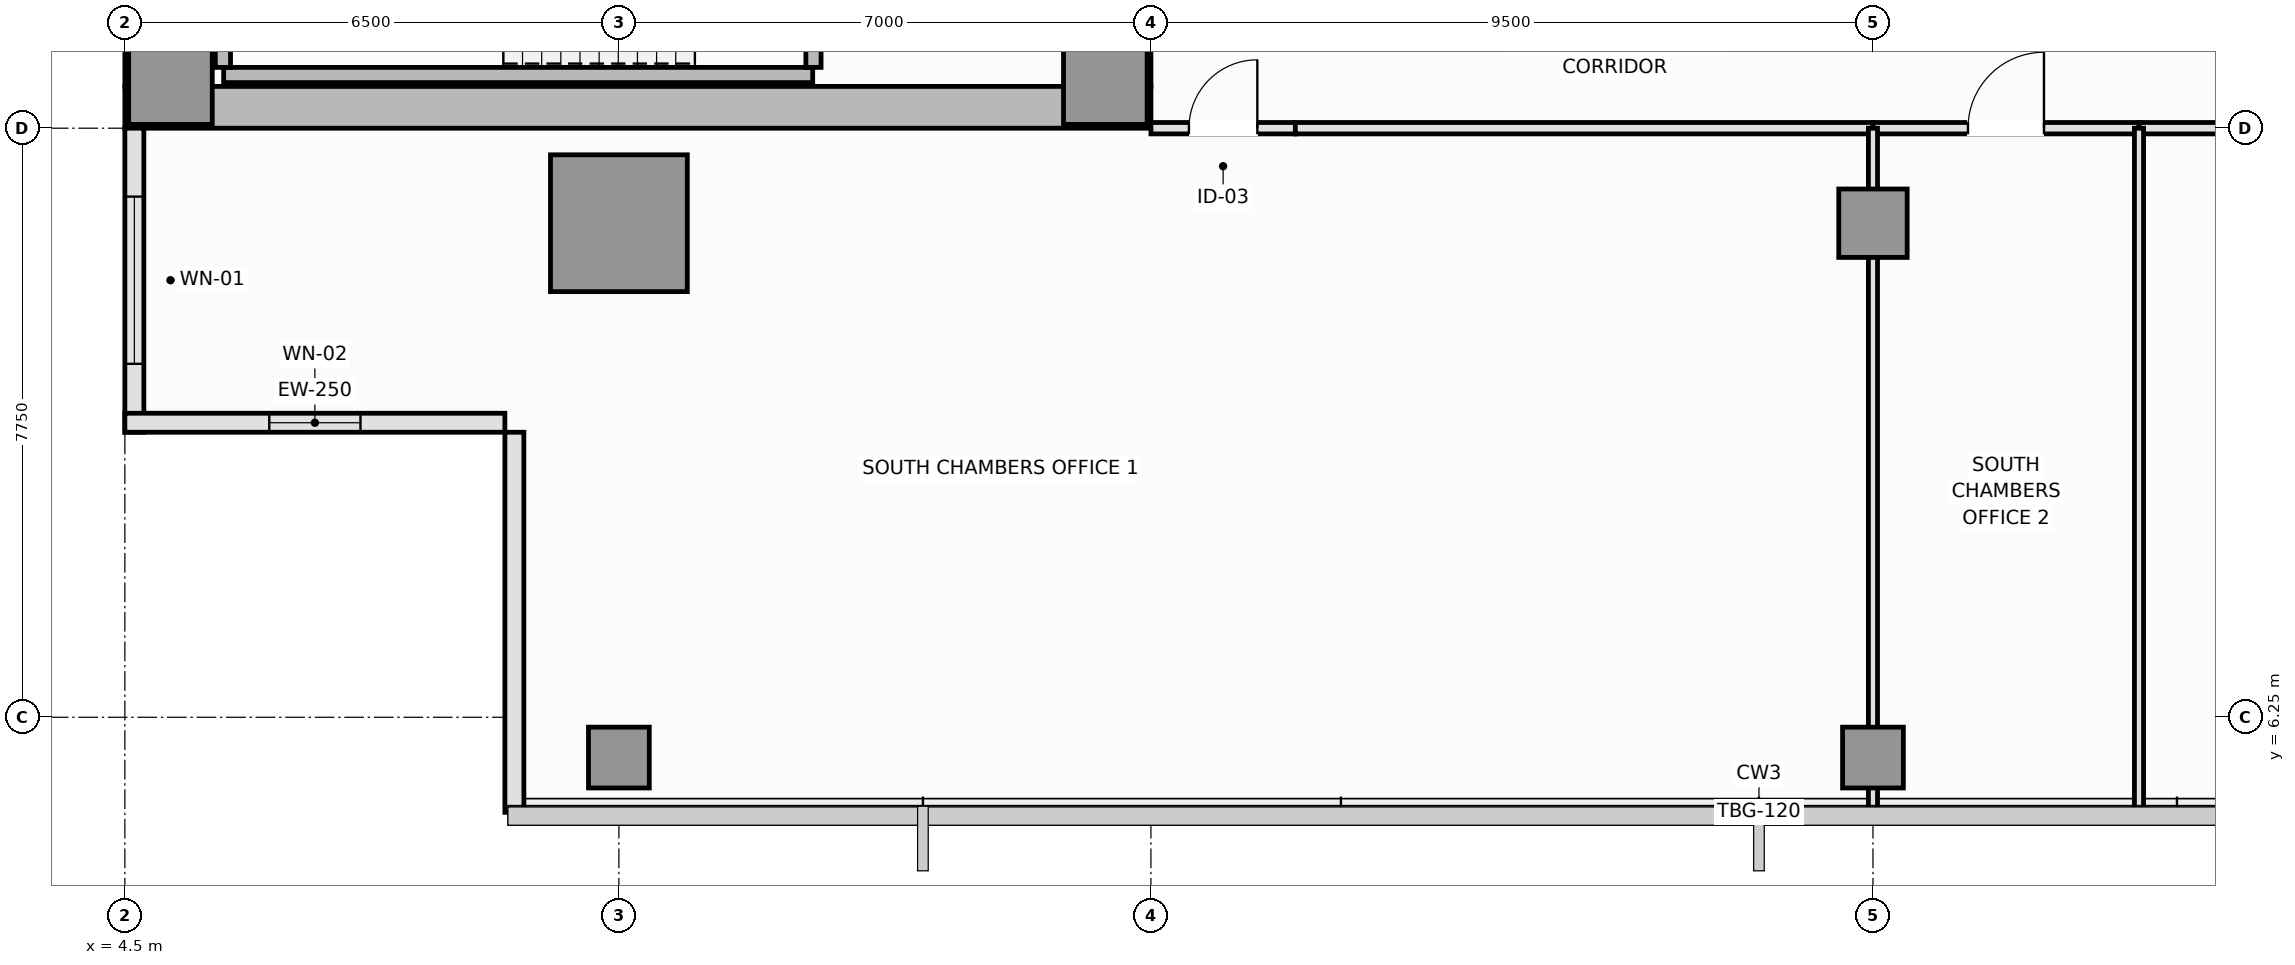
"""IFC4 building model, lengths in metres.
Left out: names, types, materials, properties, quantities, classifications, styles, units other than length and angle.
Written with IfcOpenShell. Run it as: python <this file> out.ifc"""

import sys

from ifc_helpers import new_model, si_unit, direction, frame, frame_2d, origin, origin_2d, place, context, subcontext, project, spatial, rectangle, extrude, element, fill, save


model = new_model("IFC4")
c1 = context("Model", 3, precision=1e-05, world=origin(), true_north=direction((0.0, 1.0)))
c2 = subcontext(c1, "Body", "Model", "MODEL_VIEW")
j1 = project(units=[si_unit("LENGTHUNIT", "METRE"), si_unit("PLANEANGLEUNIT", "RADIAN")], contexts=[c1])
p1 = place(None, origin())
s1 = spatial("IfcSite", under=j1, at=p1, CompositionType="ELEMENT")
p2 = place(p1, origin())
s2 = spatial("IfcBuilding", under=s1, at=p2, CompositionType="ELEMENT")
p3 = place(p2, frame((0.0, 0.0, 223.55)))
s3 = spatial("IfcBuildingStorey", under=s2, at=p3, CompositionType="ELEMENT", Elevation=223.55)
p4 = place(p3, frame((4.5, 14.275, 0.0), z_axis=(0.0, 0.0, 1.0), x_axis=(1.0, 0.0, 0.0)))
e1 = element("IfcWall", 1, at=p4, inside=s3, PredefinedType="SHEAR", context=c2, shape_type="SweptSolid", body=[
    extrude(rectangle(XDim=13.5, YDim=0.55, at=frame_2d((6.75, 0.0))), origin(), (0.0, 0.0, 1.0), 3.55),
])
p5 = place(p3, frame((4.775, 14.55, 0.0), z_axis=(0.0, 0.0, 1.0), x_axis=(0.0, 1.0, 0.0)))
e2 = element("IfcWall", 2, at=p5, inside=s3, PredefinedType="SHEAR", context=c2, shape_type="SweptSolid", body=[
    extrude(rectangle(XDim=21.4, YDim=0.55, at=frame_2d((10.7, 0.0))), origin(), (0.0, 0.0, 1.0), 3.55),
])
p6 = place(p3, frame((17.725, 14.55, 0.0), z_axis=(0.0, 0.0, 1.0), x_axis=(0.0, 1.0, 0.0)))
e3 = element("IfcWall", 3, at=p6, inside=s3, PredefinedType="SHEAR", context=c2, shape_type="SweptSolid", body=[
    extrude(rectangle(XDim=8.9, YDim=0.55, at=frame_2d((4.45, 0.0))), origin(), (0.0, 0.0, 1.0), 3.55),
])
p7 = place(p6, frame((4.35, 0.0, 0.0)))
e4 = element("IfcOpeningElement", 4, at=p7, cuts=e3, PredefinedType="OPENING", context=c2, shape_type="SweptSolid", body=[
    extrude(rectangle(XDim=1.1, YDim=2.15, at=frame_2d((0.55, 1.075))), frame((0.0, 0.285, 0.0), z_axis=(0.0, -1.0, 0.0), x_axis=(1.0, 0.0, 0.0)), (0.0, 0.0, 1.0), 0.57),
])
for number, where, z_axis, x_axis in (
    (5, (5.1, 14.6, 0.0), (0.0, 0.0, 1.0), (1.0, 0.0, 0.0)),
    (6, (17.4, 14.6, 0.0), (0.0, 0.0, 1.0), (1.0, 0.0, 0.0)),
):
    element("IfcColumn", number, at=place(p3, frame(where, z_axis=z_axis, x_axis=x_axis)), inside=s3, PredefinedType="PILASTER", context=c2, shape_type="SweptSolid", body=[
        extrude(rectangle(XDim=1.1, YDim=1.1, at=origin_2d()), origin(), (0.0, 0.0, 1.0), 3.55),
    ])
p8 = place(p3, frame((11.0, 12.75, 0.0), z_axis=(0.0, 0.0, 1.0), x_axis=(1.0, 0.0, 0.0)))
e7 = element("IfcColumn", 7, at=p8, inside=s3, PredefinedType="COLUMN", context=c2, shape_type="SweptSolid", body=[
    extrude(rectangle(XDim=1.8, YDim=1.8, at=origin_2d()), origin(), (0.0, 0.0, 1.0), 3.55),
])
p9 = place(p3, frame((27.5, 12.75, 0.0), z_axis=(0.0, 0.0, 1.0), x_axis=(1.0, 0.0, 0.0)))
e8 = element("IfcColumn", 8, at=p9, inside=s3, PredefinedType="COLUMN", context=c2, shape_type="SweptSolid", body=[
    extrude(rectangle(XDim=0.9, YDim=0.9, at=origin_2d()), origin(), (0.0, 0.0, 1.0), 3.55),
])
for number, where, z_axis, x_axis in (
    (9, (11.0, 5.72, 0.0), (0.0, 0.0, 1.0), (1.0, 0.0, 0.0)),
    (10, (27.5, 5.72, 0.0), (0.0, 0.0, 1.0), (1.0, 0.0, 0.0)),
):
    element("IfcColumn", number, at=place(p3, frame(where, z_axis=z_axis, x_axis=x_axis)), inside=s3, PredefinedType="COLUMN", context=c2, shape_type="SweptSolid", body=[
        extrude(rectangle(XDim=0.8, YDim=0.8, at=origin_2d()), origin(), (0.0, 0.0, 1.0), 3.55),
    ])
p10 = place(p3, frame((4.625, 14.0, 0.0), z_axis=(0.0, 0.0, 1.0), x_axis=(0.0, -1.0, 0.0)))
e11 = element("IfcWall", 11, at=p10, inside=s3, PredefinedType="SOLIDWALL", context=c2, shape_type="SweptSolid", body=[
    extrude(rectangle(XDim=4.0, YDim=0.25, at=frame_2d((2.0, 0.0))), origin(), (0.0, 0.0, 1.0), 3.37),
])
p11 = place(p10, frame((0.9, 0.0, 0.9)))
e12 = element("IfcOpeningElement", 12, at=p11, cuts=e11, PredefinedType="OPENING", context=c2, shape_type="SweptSolid", body=[
    extrude(rectangle(XDim=2.2, YDim=1.8, at=frame_2d((1.1, 0.9))), frame((0.0, 0.135, 0.0), z_axis=(0.0, -1.0, 0.0), x_axis=(1.0, 0.0, 0.0)), (0.0, 0.0, 1.0), 0.27),
])
p12 = place(p3, frame((4.5, 10.125, 0.0), z_axis=(0.0, 0.0, 1.0), x_axis=(1.0, 0.0, 0.0)))
e13 = element("IfcWall", 13, at=p12, inside=s3, PredefinedType="SOLIDWALL", context=c2, shape_type="SweptSolid", body=[
    extrude(rectangle(XDim=5.0, YDim=0.25, at=frame_2d((2.5, 0.0))), origin(), (0.0, 0.0, 1.0), 3.37),
])
p13 = place(p12, frame((1.9, 0.0, 0.9)))
e14 = element("IfcOpeningElement", 14, at=p13, cuts=e13, PredefinedType="OPENING", context=c2, shape_type="SweptSolid", body=[
    extrude(rectangle(XDim=1.2, YDim=1.8, at=frame_2d((0.6, 0.9))), frame((0.0, 0.135, 0.0), z_axis=(0.0, -1.0, 0.0), x_axis=(1.0, 0.0, 0.0)), (0.0, 0.0, 1.0), 0.27),
])
p14 = place(p3, frame((9.625, 10.0, 0.0), z_axis=(0.0, 0.0, 1.0), x_axis=(0.0, -1.0, 0.0)))
e15 = element("IfcWall", 15, at=p14, inside=s3, PredefinedType="SOLIDWALL", context=c2, shape_type="SweptSolid", body=[
    extrude(rectangle(XDim=5.0, YDim=0.25, at=frame_2d((2.5, 0.0))), origin(), (0.0, 0.0, 1.0), 3.37),
])
p15 = place(p3, frame((5.8, 14.7, 0.0), z_axis=(0.0, 0.0, 1.0), x_axis=(1.0, 0.0, 0.0)))
e16 = element("IfcWall", 16, at=p15, inside=s3, PredefinedType="SOLIDWALL", context=c2, shape_type="SweptSolid", body=[
    extrude(rectangle(XDim=7.75, YDim=0.2, at=frame_2d((3.875, 0.0))), origin(), (0.0, 0.0, 1.0), 3.55),
])
p16 = place(p3, frame((5.79, 14.8, 0.0), z_axis=(0.0, 0.0, 1.0), x_axis=(0.0, 1.0, 0.0)))
e17 = element("IfcWall", 17, at=p16, inside=s3, PredefinedType="SOLIDWALL", context=c2, shape_type="SweptSolid", body=[
    extrude(rectangle(XDim=3.05, YDim=0.2, at=frame_2d((1.525, 0.0))), origin(), (0.0, 0.0, 1.0), 3.55),
])
p17 = place(p3, frame((13.56, 14.8, 0.0), z_axis=(0.0, 0.0, 1.0), x_axis=(0.0, 1.0, 0.0)))
e18 = element("IfcWall", 18, at=p17, inside=s3, PredefinedType="SOLIDWALL", context=c2, shape_type="SweptSolid", body=[
    extrude(rectangle(XDim=3.05, YDim=0.2, at=frame_2d((1.525, 0.0))), origin(), (0.0, 0.0, 1.0), 3.55),
])
p18 = place(p17, frame((0.95, 0.0, 0.0)))
e19 = element("IfcOpeningElement", 19, at=p18, cuts=e18, PredefinedType="OPENING", context=c2, shape_type="SweptSolid", body=[
    extrude(rectangle(XDim=1.15, YDim=2.15, at=frame_2d((0.575, 1.075))), frame((0.0, 0.11, 0.0), z_axis=(0.0, -1.0, 0.0), x_axis=(1.0, 0.0, 0.0)), (0.0, 0.0, 1.0), 0.22),
])
p19 = place(p3, frame((18.0, 14.0, 0.0), z_axis=(0.0, 0.0, 1.0), x_axis=(1.0, 0.0, 0.0)))
e20 = element("IfcWall", 20, at=p19, inside=s3, PredefinedType="PARTITIONING", context=c2, shape_type="SweptSolid", body=[
    extrude(rectangle(XDim=1.9, YDim=0.15, at=frame_2d((0.95, 0.0))), origin(), (0.0, 0.0, 1.0), 3.37),
])
p20 = place(p19, frame((0.5, 0.0, 0.0)))
e21 = element("IfcOpeningElement", 21, at=p20, cuts=e20, PredefinedType="OPENING", context=c2, shape_type="SweptSolid", body=[
    extrude(rectangle(XDim=0.9, YDim=2.1, at=frame_2d((0.45, 1.05))), frame((0.0, 0.085, 0.0), z_axis=(0.0, -1.0, 0.0), x_axis=(1.0, 0.0, 0.0)), (0.0, 0.0, 1.0), 0.17),
])
p21 = place(p3, frame((19.9, 14.0, 0.0), z_axis=(0.0, 0.0, 1.0), x_axis=(1.0, 0.0, 0.0)))
e22 = element("IfcWall", 22, at=p21, inside=s3, PredefinedType="PARTITIONING", context=c2, shape_type="SweptSolid", body=[
    extrude(rectangle(XDim=7.6, YDim=0.15, at=frame_2d((3.8, 0.0))), origin(), (0.0, 0.0, 1.0), 3.37),
])
p22 = place(p3, frame((27.5, 14.0, 0.0), z_axis=(0.0, 0.0, 1.0), x_axis=(1.0, 0.0, 0.0)))
e23 = element("IfcWall", 23, at=p22, inside=s3, PredefinedType="PARTITIONING", context=c2, shape_type="SweptSolid", body=[
    extrude(rectangle(XDim=3.5, YDim=0.15, at=frame_2d((1.75, 0.0))), origin(), (0.0, 0.0, 1.0), 3.37),
])
p23 = place(p22, frame((1.25, 0.0, 0.0)))
e24 = element("IfcOpeningElement", 24, at=p23, cuts=e23, PredefinedType="OPENING", context=c2, shape_type="SweptSolid", body=[
    extrude(rectangle(XDim=1.0, YDim=2.15, at=frame_2d((0.5, 1.075))), frame((0.0, 0.085, 0.0), z_axis=(0.0, -1.0, 0.0), x_axis=(1.0, 0.0, 0.0)), (0.0, 0.0, 1.0), 0.17),
])
p24 = place(p3, frame((31.0, 14.0, 0.0), z_axis=(0.0, 0.0, 1.0), x_axis=(1.0, 0.0, 0.0)))
e25 = element("IfcWall", 25, at=p24, inside=s3, PredefinedType="PARTITIONING", context=c2, shape_type="SweptSolid", body=[
    extrude(rectangle(XDim=3.6, YDim=0.15, at=frame_2d((1.8, 0.0))), origin(), (0.0, 0.0, 1.0), 3.37),
])
p25 = place(p24, frame((1.3, 0.0, 0.0)))
e26 = element("IfcOpeningElement", 26, at=p25, cuts=e25, PredefinedType="OPENING", context=c2, shape_type="SweptSolid", body=[
    extrude(rectangle(XDim=1.0, YDim=2.15, at=frame_2d((0.5, 1.075))), frame((0.0, 0.085, 0.0), z_axis=(0.0, -1.0, 0.0), x_axis=(1.0, 0.0, 0.0)), (0.0, 0.0, 1.0), 0.17),
])
p26 = place(p3, frame((27.5, 5.01, 0.0), z_axis=(0.0, 0.0, 1.0), x_axis=(0.0, 1.0, 0.0)))
e27 = element("IfcWall", 27, at=p26, inside=s3, PredefinedType="PARTITIONING", context=c2, shape_type="SweptSolid", body=[
    extrude(rectangle(XDim=8.99, YDim=0.12, at=frame_2d((4.495, 0.0))), origin(), (0.0, 0.0, 1.0), 2.92),
])
p27 = place(p3, frame((31.0, 5.01, 0.0), z_axis=(0.0, 0.0, 1.0), x_axis=(0.0, 1.0, 0.0)))
e28 = element("IfcWall", 28, at=p27, inside=s3, PredefinedType="PARTITIONING", context=c2, shape_type="SweptSolid", body=[
    extrude(rectangle(XDim=8.99, YDim=0.12, at=frame_2d((4.495, 0.0))), origin(), (0.0, 0.0, 1.0), 3.37),
])
p28 = place(p11, origin())
e29 = element("IfcWindow", 29, at=p28, inside=s3, PartitioningType="SINGLE_PANEL", PredefinedType="WINDOW", context=c2, shape_type="SweptSolid", body=[
    extrude(rectangle(XDim=2.2, YDim=1.8, at=frame_2d((1.1, 0.9))), frame((0.0, 0.03, 0.0), z_axis=(0.0, -1.0, 0.0), x_axis=(1.0, 0.0, 0.0)), (0.0, 0.0, 1.0), 0.06),
])
fill(e12, e29)
p29 = place(p13, origin())
e30 = element("IfcWindow", 30, at=p29, inside=s3, PartitioningType="SINGLE_PANEL", PredefinedType="WINDOW", context=c2, shape_type="SweptSolid", body=[
    extrude(rectangle(XDim=1.2, YDim=1.8, at=frame_2d((0.6, 0.9))), frame((0.0, 0.03, 0.0), z_axis=(0.0, -1.0, 0.0), x_axis=(1.0, 0.0, 0.0)), (0.0, 0.0, 1.0), 0.06),
])
fill(e14, e30)
p30 = place(p20, origin())
e31 = element("IfcDoor", 31, at=p30, inside=s3, OperationType="SINGLE_SWING_RIGHT", PredefinedType="DOOR", context=c2, shape_type="SweptSolid", body=[
    extrude(rectangle(XDim=0.9, YDim=2.1, at=frame_2d((0.45, 1.05))), frame((0.0, 0.025, 0.0), z_axis=(0.0, -1.0, 0.0), x_axis=(1.0, 0.0, 0.0)), (0.0, 0.0, 1.0), 0.05),
])
fill(e21, e31)
p31 = place(p23, origin())
e32 = element("IfcDoor", 32, at=p31, inside=s3, OperationType="SINGLE_SWING_RIGHT", PredefinedType="DOOR", context=c2, shape_type="SweptSolid", body=[
    extrude(rectangle(XDim=1.0, YDim=2.15, at=frame_2d((0.5, 1.075))), frame((0.0, 0.025, 0.0), z_axis=(0.0, -1.0, 0.0), x_axis=(1.0, 0.0, 0.0)), (0.0, 0.0, 1.0), 0.05),
])
fill(e24, e32)
save(model, sys.argv[1])
